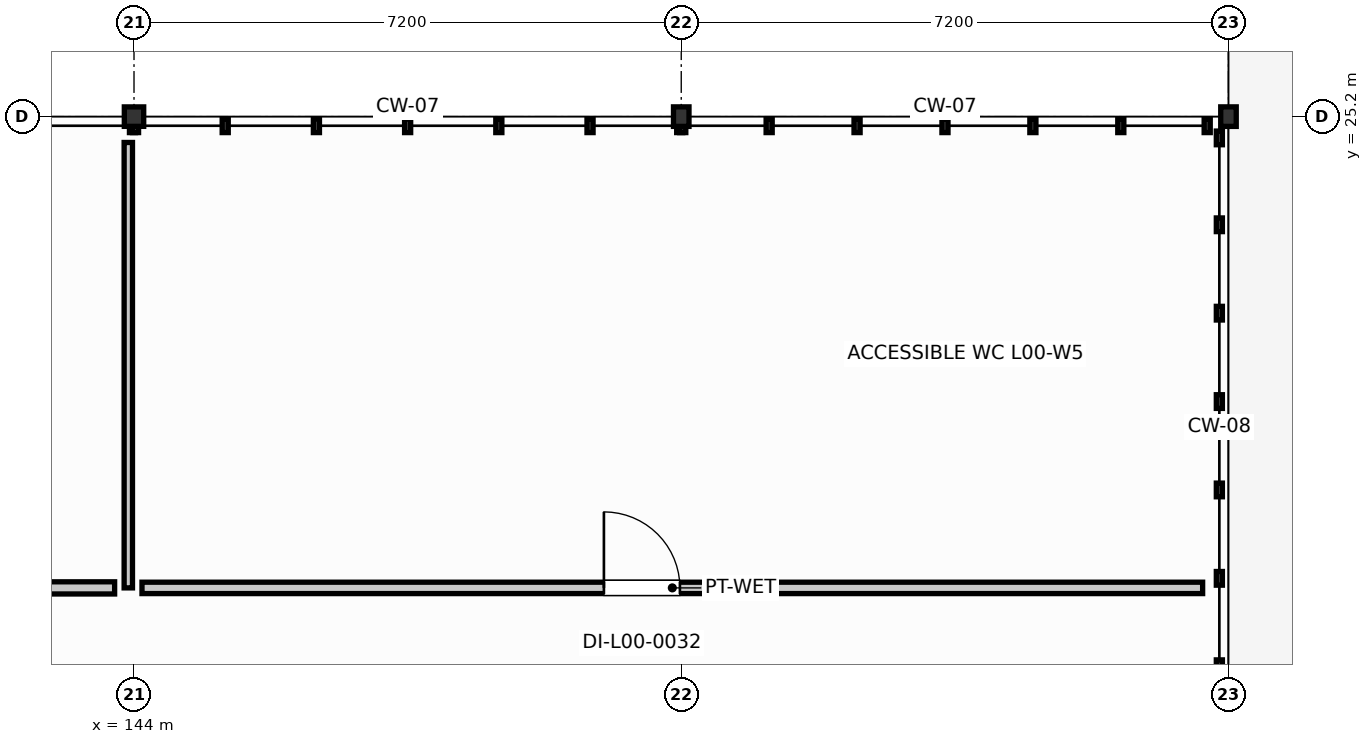
"""IFC4 building model, lengths in metres.
Left out: names, types, materials, properties, quantities, classifications, styles, units other than length and angle.
Written with IfcOpenShell. Run it as: python <this file> out.ifc"""

import sys

from ifc_helpers import new_model, si_unit, direction, frame, frame_2d, origin, origin_2d, place, context, subcontext, project, spatial, rectangle, i_section, extrude, element, fill, save


model = new_model("IFC4")
c1 = context("Model", 3, precision=1e-05, world=origin(), true_north=direction((0.0, 1.0)))
c2 = subcontext(c1, "Body", "Model", "MODEL_VIEW")
j1 = project(units=[si_unit("LENGTHUNIT", "METRE"), si_unit("PLANEANGLEUNIT", "RADIAN")], contexts=[c1])
p1 = place(None, origin())
s1 = spatial("IfcSite", under=j1, at=p1, CompositionType="ELEMENT")
p2 = place(p1, origin())
s2 = spatial("IfcBuilding", under=s1, at=p2, CompositionType="ELEMENT")
p3 = place(p2, origin())
s3 = spatial("IfcBuildingStorey", under=s2, at=p3, CompositionType="ELEMENT", Elevation=0.0)
p4 = place(p3, frame((144.0, 25.2, 0.0), z_axis=(0.0, 0.0, 1.0), x_axis=(1.0, 0.0, 0.0)))
e1 = element("IfcColumn", 1, at=p4, inside=s3, PredefinedType="COLUMN", context=c2, shape_type="SweptSolid", body=[
    extrude(i_section(OverallWidth=0.255, OverallDepth=0.256, WebThickness=0.01, FlangeThickness=0.016, FilletRadius=0.013, at=origin_2d()), origin(), (0.0, 0.0, 1.0), 4.8),
])
for number, where, z_axis, x_axis in (
    (2, (151.2, 25.2, 0.0), (0.0, 0.0, 1.0), (1.0, 0.0, 0.0)),
    (3, (158.4, 25.2, 0.0), (0.0, 0.0, 1.0), (1.0, 0.0, 0.0)),
):
    element("IfcColumn", number, at=place(p3, frame(where, z_axis=z_axis, x_axis=x_axis)), inside=s3, PredefinedType="COLUMN", context=c2, shape_type="SweptSolid", body=[
        extrude(i_section(OverallWidth=0.204, OverallDepth=0.257, WebThickness=0.009, FlangeThickness=0.016, FilletRadius=0.013, at=origin_2d()), origin(), (0.0, 0.0, 1.0), 4.8),
    ])
p5 = place(p3, frame((143.925, 24.86, 0.0), z_axis=(0.0, 0.0, 1.0), x_axis=(0.0, -1.0, 0.0)))
e4 = element("IfcWall", 4, at=p5, inside=s3, PredefinedType="MOVABLE", context=c2, shape_type="SweptSolid", body=[
    extrude(rectangle(XDim=5.86, YDim=0.11, at=frame_2d((2.93, 0.0))), origin(), (0.0, 0.0, 1.0), 3.928),
])
p6 = place(p3, frame((143.745, 19.0, 0.0), z_axis=(0.0, 0.0, 1.0), x_axis=(-1.0, 0.0, 0.0)))
e5 = element("IfcWall", 5, at=p6, inside=s3, PredefinedType="PARTITIONING", context=c2, shape_type="SweptSolid", body=[
    extrude(rectangle(XDim=13.965, YDim=0.16, at=frame_2d((6.982, 0.0))), origin(), (0.0, 0.0, 1.0), 3.775),
])
p7 = place(p6, frame((6.333, 0.0, 0.0)))
e6 = element("IfcOpeningElement", 6, at=p7, cuts=e5, PredefinedType="OPENING", context=c2, shape_type="SweptSolid", body=[
    extrude(rectangle(XDim=0.9, YDim=2.04, at=frame_2d((0.45, 1.02))), frame((0.0, 0.09, 0.0), z_axis=(0.0, -1.0, 0.0), x_axis=(1.0, 0.0, 0.0)), (0.0, 0.0, 1.0), 0.18),
])
p8 = place(p3, frame((158.06, 19.0, 0.0), z_axis=(0.0, 0.0, 1.0), x_axis=(-1.0, 0.0, 0.0)))
e7 = element("IfcWall", 7, at=p8, inside=s3, PredefinedType="PLUMBINGWALL", context=c2, shape_type="SweptSolid", body=[
    extrude(rectangle(XDim=13.955, YDim=0.15, at=frame_2d((6.978, 0.0))), origin(), (0.0, 0.0, 1.0), 3.928),
])
p9 = place(p8, frame((6.877, 0.0, 0.0)))
e8 = element("IfcOpeningElement", 8, at=p9, cuts=e7, PredefinedType="OPENING", context=c2, shape_type="SweptSolid", body=[
    extrude(rectangle(XDim=1.0, YDim=2.1, at=frame_2d((0.5, 1.05))), frame((0.0, 0.085, 0.0), z_axis=(0.0, -1.0, 0.0), x_axis=(1.0, 0.0, 0.0)), (0.0, 0.0, 1.0), 0.17),
])
p10 = place(p9, frame((1.0, 0.0, 0.0), z_axis=(0.0, 0.0, 1.0), x_axis=(-1.0, 0.0, 0.0)))
e9 = element("IfcDoor", 9, at=p10, inside=s3, OperationType="SINGLE_SWING_LEFT", PredefinedType="DOOR", context=c2, shape_type="SweptSolid", body=[
    extrude(rectangle(XDim=1.0, YDim=2.1, at=frame_2d((0.5, 1.05))), frame((0.0, 0.025, 0.0), z_axis=(0.0, -1.0, 0.0), x_axis=(1.0, 0.0, 0.0)), (0.0, 0.0, 1.0), 0.05),
])
fill(e8, e9)
save(model, sys.argv[1])
